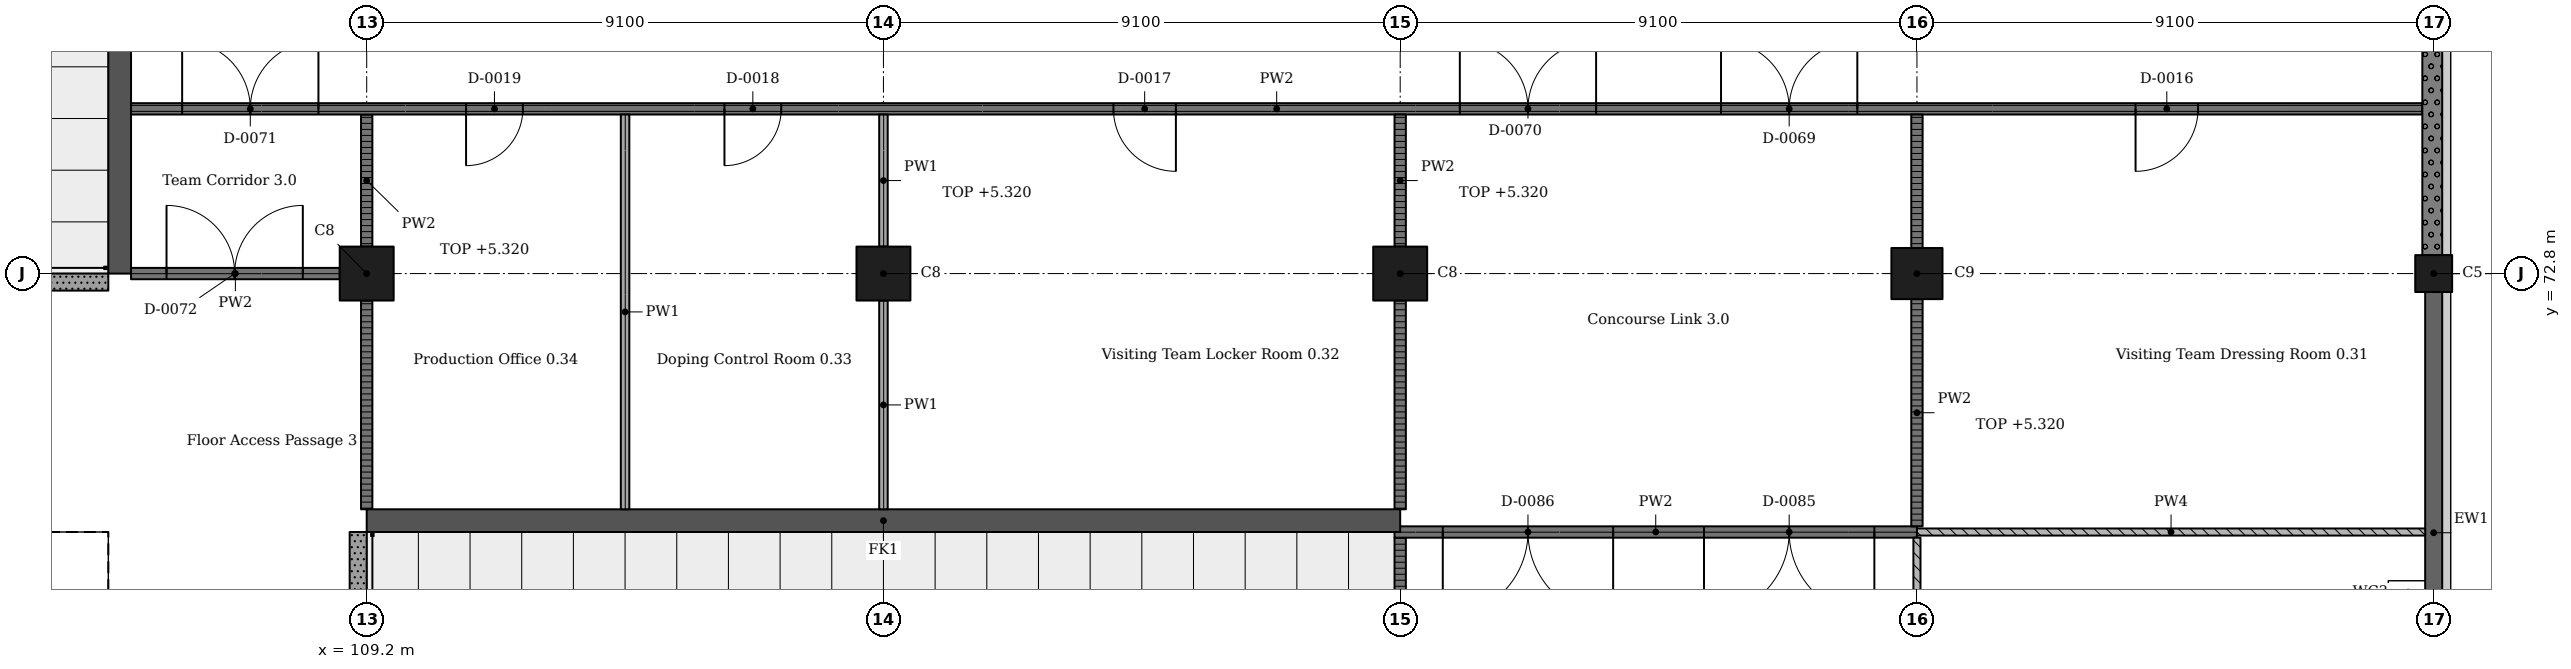
"""IFC4 building model, lengths in metres.
Left out: names, types, materials, properties, quantities, classifications, styles, units other than length and angle.
Written with IfcOpenShell. Run it as: python <this file> out.ifc"""

import sys

from ifc_helpers import new_model, si_unit, direction, frame, frame_2d, origin, origin_2d, place, context, subcontext, project, spatial, rectangle, extrude, element, fill, save


model = new_model("IFC4")
c1 = context("Model", 3, precision=1e-05, world=origin(), true_north=direction((0.0, 1.0)))
c2 = subcontext(c1, "Body", "Model", "MODEL_VIEW")
j1 = project(units=[si_unit("LENGTHUNIT", "METRE"), si_unit("PLANEANGLEUNIT", "RADIAN")], contexts=[c1])
p1 = place(None, origin())
s1 = spatial("IfcSite", under=j1, at=p1, CompositionType="ELEMENT")
p2 = place(p1, origin())
s2 = spatial("IfcBuilding", under=s1, at=p2, CompositionType="ELEMENT")
p3 = place(p2, origin())
s3 = spatial("IfcBuildingStorey", under=s2, at=p3, CompositionType="ELEMENT", Elevation=0.0)
for number, where, z_axis, x_axis in (
    (1, (109.2, 72.8, -0.4), (0.0, 0.0, 1.0), (1.0, 0.0, 0.0)),
    (2, (118.3, 72.8, -0.4), (0.0, 0.0, 1.0), (1.0, 0.0, 0.0)),
    (3, (127.4, 72.8, -0.4), (0.0, 0.0, 1.0), (1.0, 0.0, 0.0)),
):
    element("IfcColumn", number, at=place(p3, frame(where, z_axis=z_axis, x_axis=x_axis)), inside=s3, PredefinedType="COLUMN", context=c2, shape_type="SweptSolid", body=[
        extrude(rectangle(XDim=0.95, YDim=0.95, at=origin_2d()), origin(), (0.0, 0.0, 1.0), 6.77),
    ])
p4 = place(p3, frame((136.5, 72.8, -0.4), z_axis=(0.0, 0.0, 1.0), x_axis=(1.0, 0.0, 0.0)))
e4 = element("IfcColumn", 4, at=p4, inside=s3, PredefinedType="COLUMN", context=c2, shape_type="SweptSolid", body=[
    extrude(rectangle(XDim=0.9, YDim=0.9, at=origin_2d()), origin(), (0.0, 0.0, 1.0), 6.77),
])
p5 = place(p3, frame((145.6, 72.8, -0.4), z_axis=(0.0, 0.0, 1.0), x_axis=(1.0, 0.0, 0.0)))
e5 = element("IfcColumn", 5, at=p5, inside=s3, PredefinedType="COLUMN", context=c2, shape_type="SweptSolid", body=[
    extrude(rectangle(XDim=0.65, YDim=0.65, at=origin_2d()), origin(), (0.0, 0.0, 1.0), 6.77),
])
p6 = place(p3, frame((40.95, 72.65, -0.4), z_axis=(0.0, 0.0, 1.0), x_axis=(1.0, 0.0, 0.0)))
e6 = element("IfcWall", 6, at=p6, inside=s3, PredefinedType="SOLIDWALL", context=c2, shape_type="SweptSolid", body=[
    extrude(rectangle(XDim=63.7, YDim=0.3, at=frame_2d((31.85, 0.0))), origin(), (0.0, 0.0, 1.0), 1.45),
])
p7 = place(p3, frame((109.05, 40.95, -0.4), z_axis=(0.0, 0.0, 1.0), x_axis=(0.0, 1.0, 0.0)))
e7 = element("IfcWall", 7, at=p7, inside=s3, PredefinedType="SOLIDWALL", context=c2, shape_type="SweptSolid", body=[
    extrude(rectangle(XDim=27.3, YDim=0.3, at=frame_2d((13.65, 0.0))), origin(), (0.0, 0.0, 1.0), 1.45),
])
for number, where, z_axis, x_axis in (
    (8, (104.85, 72.8, -0.4), (0.0, 0.0, 1.0), (0.0, 1.0, 0.0)),
    (9, (109.2, 68.45, -0.4), (0.0, 0.0, 1.0), (1.0, 0.0, 0.0)),
):
    element("IfcWall", number, at=place(p3, frame(where, z_axis=z_axis, x_axis=x_axis)), inside=s3, PredefinedType="SHEAR", context=c2, shape_type="SweptSolid", body=[
        extrude(rectangle(XDim=18.2, YDim=0.4, at=frame_2d((9.1, 0.0))), origin(), (0.0, 0.0, 1.0), 6.77),
    ])
p8 = place(p3, frame((145.6, 64.0, 0.0), z_axis=(0.0, 0.0, 1.0), x_axis=(0.0, 1.0, 0.0)))
e10 = element("IfcWall", 10, at=p8, inside=s3, PredefinedType="SOLIDWALL", context=c2, shape_type="SweptSolid", body=[
    extrude(rectangle(XDim=8.475, YDim=0.3, at=frame_2d((4.238, 0.0))), origin(), (0.0, 0.0, 1.0), 5.27),
])
p9 = place(p3, frame((145.575, 73.125, 0.0), z_axis=(0.0, 0.0, 1.0), x_axis=(0.0, 1.0, 0.0)))
e11 = element("IfcWall", 11, at=p9, inside=s3, PredefinedType="SOLIDWALL", context=c2, shape_type="SweptSolid", body=[
    extrude(rectangle(XDim=8.525, YDim=0.35, at=frame_2d((4.262, 0.0))), origin(), (0.0, 0.0, 1.0), 5.27),
])
p10 = place(p3, frame((108.725, 72.8, 0.0), z_axis=(0.0, 0.0, 1.0), x_axis=(-1.0, 0.0, 0.0)))
e12 = element("IfcWall", 12, at=p10, inside=s3, PredefinedType="PARTITIONING", context=c2, shape_type="SweptSolid", body=[
    extrude(rectangle(XDim=3.675, YDim=0.2, at=frame_2d((1.837, 0.0))), origin(), (0.0, 0.0, 1.0), 6.02),
])
p11 = place(p10, frame((0.65, 0.0, 0.0)))
e13 = element("IfcOpeningElement", 13, at=p11, cuts=e12, PredefinedType="OPENING", context=c2, shape_type="SweptSolid", body=[
    extrude(rectangle(XDim=2.4, YDim=2.4, at=frame_2d((1.2, 1.2))), frame((0.0, 0.11, 0.0), z_axis=(0.0, -1.0, 0.0), x_axis=(1.0, 0.0, 0.0)), (0.0, 0.0, 1.0), 0.22),
])
p12 = place(p3, frame((109.2, 68.65, 0.0), z_axis=(0.0, 0.0, 1.0), x_axis=(0.0, 1.0, 0.0)))
e14 = element("IfcWall", 14, at=p12, inside=s3, PredefinedType="PARTITIONING", context=c2, shape_type="SweptSolid", body=[
    extrude(rectangle(XDim=3.675, YDim=0.2, at=frame_2d((1.837, 0.0))), origin(), (0.0, 0.0, 1.0), 6.02),
])
p13 = place(p3, frame((109.2, 73.275, 0.0), z_axis=(0.0, 0.0, 1.0), x_axis=(0.0, 1.0, 0.0)))
e15 = element("IfcWall", 15, at=p13, inside=s3, PredefinedType="PARTITIONING", context=c2, shape_type="SweptSolid", body=[
    extrude(rectangle(XDim=2.325, YDim=0.2, at=frame_2d((1.163, 0.0))), origin(), (0.0, 0.0, 1.0), 5.32),
])
p14 = place(p3, frame((105.05, 75.7, 0.0), z_axis=(0.0, 0.0, 1.0), x_axis=(1.0, 0.0, 0.0)))
e16 = element("IfcWall", 16, at=p14, inside=s3, PredefinedType="PARTITIONING", context=c2, shape_type="SweptSolid", body=[
    extrude(rectangle(XDim=40.35, YDim=0.2, at=frame_2d((20.175, 0.0))), origin(), (0.0, 0.0, 1.0), 6.02),
])
p15 = place(p14, frame((35.3, 0.0, 0.0)))
e17 = element("IfcOpeningElement", 17, at=p15, cuts=e16, PredefinedType="OPENING", context=c2, shape_type="SweptSolid", body=[
    extrude(rectangle(XDim=1.1, YDim=2.1, at=frame_2d((0.55, 1.05))), frame((0.0, 0.11, 0.0), z_axis=(0.0, -1.0, 0.0), x_axis=(1.0, 0.0, 0.0)), (0.0, 0.0, 1.0), 0.22),
])
p16 = place(p14, frame((17.3, 0.0, 0.0)))
e18 = element("IfcOpeningElement", 18, at=p16, cuts=e16, PredefinedType="OPENING", context=c2, shape_type="SweptSolid", body=[
    extrude(rectangle(XDim=1.1, YDim=2.1, at=frame_2d((0.55, 1.05))), frame((0.0, 0.11, 0.0), z_axis=(0.0, -1.0, 0.0), x_axis=(1.0, 0.0, 0.0)), (0.0, 0.0, 1.0), 0.22),
])
p17 = place(p14, frame((10.45, 0.0, 0.0)))
e19 = element("IfcOpeningElement", 19, at=p17, cuts=e16, PredefinedType="OPENING", context=c2, shape_type="SweptSolid", body=[
    extrude(rectangle(XDim=1.0, YDim=2.1, at=frame_2d((0.5, 1.05))), frame((0.0, 0.11, 0.0), z_axis=(0.0, -1.0, 0.0), x_axis=(1.0, 0.0, 0.0)), (0.0, 0.0, 1.0), 0.22),
])
p18 = place(p14, frame((5.9, 0.0, 0.0)))
e20 = element("IfcOpeningElement", 20, at=p18, cuts=e16, PredefinedType="OPENING", context=c2, shape_type="SweptSolid", body=[
    extrude(rectangle(XDim=1.0, YDim=2.1, at=frame_2d((0.5, 1.05))), frame((0.0, 0.11, 0.0), z_axis=(0.0, -1.0, 0.0), x_axis=(1.0, 0.0, 0.0)), (0.0, 0.0, 1.0), 0.22),
])
p19 = place(p14, frame((28.0, 0.0, 0.0)))
e21 = element("IfcOpeningElement", 21, at=p19, cuts=e16, PredefinedType="OPENING", context=c2, shape_type="SweptSolid", body=[
    extrude(rectangle(XDim=2.4, YDim=2.4, at=frame_2d((1.2, 1.2))), frame((0.0, 0.11, 0.0), z_axis=(0.0, -1.0, 0.0), x_axis=(1.0, 0.0, 0.0)), (0.0, 0.0, 1.0), 0.22),
])
p20 = place(p14, frame((23.4, 0.0, 0.0)))
e22 = element("IfcOpeningElement", 22, at=p20, cuts=e16, PredefinedType="OPENING", context=c2, shape_type="SweptSolid", body=[
    extrude(rectangle(XDim=2.4, YDim=2.4, at=frame_2d((1.2, 1.2))), frame((0.0, 0.11, 0.0), z_axis=(0.0, -1.0, 0.0), x_axis=(1.0, 0.0, 0.0)), (0.0, 0.0, 1.0), 0.22),
])
p21 = place(p14, frame((0.9, 0.0, 0.0)))
e23 = element("IfcOpeningElement", 23, at=p21, cuts=e16, PredefinedType="OPENING", context=c2, shape_type="SweptSolid", body=[
    extrude(rectangle(XDim=2.4, YDim=2.4, at=frame_2d((1.2, 1.2))), frame((0.0, 0.11, 0.0), z_axis=(0.0, -1.0, 0.0), x_axis=(1.0, 0.0, 0.0)), (0.0, 0.0, 1.0), 0.22),
])
p22 = place(p3, frame((113.75, 68.65, 0.0), z_axis=(0.0, 0.0, 1.0), x_axis=(0.0, 1.0, 0.0)))
e24 = element("IfcWall", 24, at=p22, inside=s3, PredefinedType="PARTITIONING", context=c2, shape_type="SweptSolid", body=[
    extrude(rectangle(XDim=6.95, YDim=0.15, at=frame_2d((3.475, 0.0))), origin(), (0.0, 0.0, 1.0), 6.02),
])
p23 = place(p3, frame((118.3, 68.65, 0.0), z_axis=(0.0, 0.0, 1.0), x_axis=(0.0, 1.0, 0.0)))
e25 = element("IfcWall", 25, at=p23, inside=s3, PredefinedType="PARTITIONING", context=c2, shape_type="SweptSolid", body=[
    extrude(rectangle(XDim=3.675, YDim=0.15, at=frame_2d((1.837, 0.0))), origin(), (0.0, 0.0, 1.0), 6.02),
])
p24 = place(p3, frame((118.3, 73.275, 0.0), z_axis=(0.0, 0.0, 1.0), x_axis=(0.0, 1.0, 0.0)))
e26 = element("IfcWall", 26, at=p24, inside=s3, PredefinedType="PARTITIONING", context=c2, shape_type="SweptSolid", body=[
    extrude(rectangle(XDim=2.325, YDim=0.15, at=frame_2d((1.163, 0.0))), origin(), (0.0, 0.0, 1.0), 5.32),
])
p25 = place(p3, frame((127.4, 63.7, 0.0), z_axis=(0.0, 0.0, 1.0), x_axis=(0.0, 1.0, 0.0)))
e27 = element("IfcWall", 27, at=p25, inside=s3, PredefinedType="PARTITIONING", context=c2, shape_type="SweptSolid", body=[
    extrude(rectangle(XDim=4.45, YDim=0.2, at=frame_2d((2.225, 0.0))), origin(), (0.0, 0.0, 1.0), 5.02),
])
p26 = place(p3, frame((127.4, 72.325, 0.0), z_axis=(0.0, 0.0, 1.0), x_axis=(0.0, -1.0, 0.0)))
e28 = element("IfcWall", 28, at=p26, inside=s3, PredefinedType="PARTITIONING", context=c2, shape_type="SweptSolid", body=[
    extrude(rectangle(XDim=3.675, YDim=0.2, at=frame_2d((1.837, 0.0))), origin(), (0.0, 0.0, 1.0), 5.02),
])
p27 = place(p3, frame((127.4, 75.6, 0.0), z_axis=(0.0, 0.0, 1.0), x_axis=(0.0, -1.0, 0.0)))
e29 = element("IfcWall", 29, at=p27, inside=s3, PredefinedType="PARTITIONING", context=c2, shape_type="SweptSolid", body=[
    extrude(rectangle(XDim=2.325, YDim=0.2, at=frame_2d((1.163, 0.0))), origin(), (0.0, 0.0, 1.0), 5.32),
])
p28 = place(p3, frame((136.5, 68.15, 0.0), z_axis=(0.0, 0.0, 1.0), x_axis=(0.0, -1.0, 0.0)))
e30 = element("IfcWall", 30, at=p28, inside=s3, PredefinedType="PARTITIONING", context=c2, shape_type="SweptSolid", body=[
    extrude(rectangle(XDim=4.025, YDim=0.125, at=frame_2d((2.012, 0.0))), origin(), (0.0, 0.0, 1.0), 5.32),
])
p29 = place(p28, frame((1.55, 0.0, 0.0)))
e31 = element("IfcOpeningElement", 31, at=p29, cuts=e30, PredefinedType="OPENING", context=c2, shape_type="SweptSolid", body=[
    extrude(rectangle(XDim=0.9, YDim=2.1, at=frame_2d((0.45, 1.05))), frame((0.0, 0.073, 0.0), z_axis=(0.0, -1.0, 0.0), x_axis=(1.0, 0.0, 0.0)), (0.0, 0.0, 1.0), 0.145),
])
p30 = place(p3, frame((136.5, 68.25, 0.0), z_axis=(0.0, 0.0, 1.0), x_axis=(-1.0, 0.0, 0.0)))
e32 = element("IfcWall", 32, at=p30, inside=s3, PredefinedType="PARTITIONING", context=c2, shape_type="SweptSolid", body=[
    extrude(rectangle(XDim=9.2, YDim=0.2, at=frame_2d((4.6, 0.0))), origin(), (0.0, 0.0, 1.0), 6.02),
])
p31 = place(p30, frame((0.75, 0.0, 0.0)))
e33 = element("IfcOpeningElement", 33, at=p31, cuts=e32, PredefinedType="OPENING", context=c2, shape_type="SweptSolid", body=[
    extrude(rectangle(XDim=3.0, YDim=2.4, at=frame_2d((1.5, 1.2))), frame((0.0, 0.11, 0.0), z_axis=(0.0, -1.0, 0.0), x_axis=(1.0, 0.0, 0.0)), (0.0, 0.0, 1.0), 0.22),
])
p32 = place(p30, frame((5.35, 0.0, 0.0)))
e34 = element("IfcOpeningElement", 34, at=p32, cuts=e32, PredefinedType="OPENING", context=c2, shape_type="SweptSolid", body=[
    extrude(rectangle(XDim=3.0, YDim=2.4, at=frame_2d((1.5, 1.2))), frame((0.0, 0.11, 0.0), z_axis=(0.0, -1.0, 0.0), x_axis=(1.0, 0.0, 0.0)), (0.0, 0.0, 1.0), 0.22),
])
p33 = place(p3, frame((136.5, 68.35, 0.0), z_axis=(0.0, 0.0, 1.0), x_axis=(0.0, 1.0, 0.0)))
e35 = element("IfcWall", 35, at=p33, inside=s3, PredefinedType="PARTITIONING", context=c2, shape_type="SweptSolid", body=[
    extrude(rectangle(XDim=4.0, YDim=0.2, at=frame_2d((2.0, 0.0))), origin(), (0.0, 0.0, 1.0), 5.32),
])
p34 = place(p3, frame((136.5, 73.25, 0.0), z_axis=(0.0, 0.0, 1.0), x_axis=(0.0, 1.0, 0.0)))
e36 = element("IfcWall", 36, at=p34, inside=s3, PredefinedType="PARTITIONING", context=c2, shape_type="SweptSolid", body=[
    extrude(rectangle(XDim=2.35, YDim=0.2, at=frame_2d((1.175, 0.0))), origin(), (0.0, 0.0, 1.0), 5.32),
])
p35 = place(p3, frame((145.45, 68.25, 0.0), z_axis=(0.0, 0.0, 1.0), x_axis=(-1.0, 0.0, 0.0)))
e37 = element("IfcWall", 37, at=p35, inside=s3, PredefinedType="PARTITIONING", context=c2, shape_type="SweptSolid", body=[
    extrude(rectangle(XDim=8.95, YDim=0.125, at=frame_2d((4.475, 0.0))), origin(), (0.0, 0.0, 1.0), 6.02),
])
p36 = place(p15, origin())
e38 = element("IfcDoor", 38, at=p36, inside=s3, OperationType="SINGLE_SWING_LEFT", PredefinedType="DOOR", context=c2, shape_type="SweptSolid", body=[
    extrude(rectangle(XDim=1.1, YDim=2.1, at=frame_2d((0.55, 1.05))), frame((0.0, 0.025, 0.0), z_axis=(0.0, -1.0, 0.0), x_axis=(1.0, 0.0, 0.0)), (0.0, 0.0, 1.0), 0.05),
])
fill(e17, e38)
p37 = place(p16, origin())
e39 = element("IfcDoor", 39, at=p37, inside=s3, OperationType="SINGLE_SWING_RIGHT", PredefinedType="DOOR", context=c2, shape_type="SweptSolid", body=[
    extrude(rectangle(XDim=1.1, YDim=2.1, at=frame_2d((0.55, 1.05))), frame((0.0, 0.025, 0.0), z_axis=(0.0, -1.0, 0.0), x_axis=(1.0, 0.0, 0.0)), (0.0, 0.0, 1.0), 0.05),
])
fill(e18, e39)
p38 = place(p17, origin())
e40 = element("IfcDoor", 40, at=p38, inside=s3, OperationType="SINGLE_SWING_LEFT", PredefinedType="DOOR", context=c2, shape_type="SweptSolid", body=[
    extrude(rectangle(XDim=1.0, YDim=2.1, at=frame_2d((0.5, 1.05))), frame((0.0, 0.025, 0.0), z_axis=(0.0, -1.0, 0.0), x_axis=(1.0, 0.0, 0.0)), (0.0, 0.0, 1.0), 0.05),
])
fill(e19, e40)
p39 = place(p18, origin())
e41 = element("IfcDoor", 41, at=p39, inside=s3, OperationType="SINGLE_SWING_LEFT", PredefinedType="DOOR", context=c2, shape_type="SweptSolid", body=[
    extrude(rectangle(XDim=1.0, YDim=2.1, at=frame_2d((0.5, 1.05))), frame((0.0, 0.025, 0.0), z_axis=(0.0, -1.0, 0.0), x_axis=(1.0, 0.0, 0.0)), (0.0, 0.0, 1.0), 0.05),
])
fill(e20, e41)
p40 = place(p19, origin())
e42 = element("IfcDoor", 42, at=p40, inside=s3, OperationType="DOUBLE_DOOR_SINGLE_SWING", PredefinedType="DOOR", context=c2, shape_type="SweptSolid", body=[
    extrude(rectangle(XDim=2.4, YDim=2.4, at=frame_2d((1.2, 1.2))), frame((0.0, 0.025, 0.0), z_axis=(0.0, -1.0, 0.0), x_axis=(1.0, 0.0, 0.0)), (0.0, 0.0, 1.0), 0.05),
])
fill(e21, e42)
p41 = place(p20, origin())
e43 = element("IfcDoor", 43, at=p41, inside=s3, OperationType="DOUBLE_DOOR_SINGLE_SWING", PredefinedType="DOOR", context=c2, shape_type="SweptSolid", body=[
    extrude(rectangle(XDim=2.4, YDim=2.4, at=frame_2d((1.2, 1.2))), frame((0.0, 0.025, 0.0), z_axis=(0.0, -1.0, 0.0), x_axis=(1.0, 0.0, 0.0)), (0.0, 0.0, 1.0), 0.05),
])
fill(e22, e43)
p42 = place(p21, origin())
e44 = element("IfcDoor", 44, at=p42, inside=s3, OperationType="DOUBLE_DOOR_SINGLE_SWING", PredefinedType="DOOR", context=c2, shape_type="SweptSolid", body=[
    extrude(rectangle(XDim=2.4, YDim=2.4, at=frame_2d((1.2, 1.2))), frame((0.0, 0.025, 0.0), z_axis=(0.0, -1.0, 0.0), x_axis=(1.0, 0.0, 0.0)), (0.0, 0.0, 1.0), 0.05),
])
fill(e23, e44)
p43 = place(p11, origin())
e45 = element("IfcDoor", 45, at=p43, inside=s3, OperationType="DOUBLE_DOOR_SINGLE_SWING", PredefinedType="DOOR", context=c2, shape_type="SweptSolid", body=[
    extrude(rectangle(XDim=2.4, YDim=2.4, at=frame_2d((1.2, 1.2))), frame((0.0, 0.025, 0.0), z_axis=(0.0, -1.0, 0.0), x_axis=(1.0, 0.0, 0.0)), (0.0, 0.0, 1.0), 0.05),
])
fill(e13, e45)
p44 = place(p31, origin())
e46 = element("IfcDoor", 46, at=p44, inside=s3, OperationType="DOUBLE_DOOR_SINGLE_SWING", PredefinedType="DOOR", context=c2, shape_type="SweptSolid", body=[
    extrude(rectangle(XDim=3.0, YDim=2.4, at=frame_2d((1.5, 1.2))), frame((0.0, 0.025, 0.0), z_axis=(0.0, -1.0, 0.0), x_axis=(1.0, 0.0, 0.0)), (0.0, 0.0, 1.0), 0.05),
])
fill(e33, e46)
p45 = place(p32, origin())
e47 = element("IfcDoor", 47, at=p45, inside=s3, OperationType="DOUBLE_DOOR_SINGLE_SWING", PredefinedType="DOOR", context=c2, shape_type="SweptSolid", body=[
    extrude(rectangle(XDim=3.0, YDim=2.4, at=frame_2d((1.5, 1.2))), frame((0.0, 0.025, 0.0), z_axis=(0.0, -1.0, 0.0), x_axis=(1.0, 0.0, 0.0)), (0.0, 0.0, 1.0), 0.05),
])
fill(e34, e47)
save(model, sys.argv[1])
